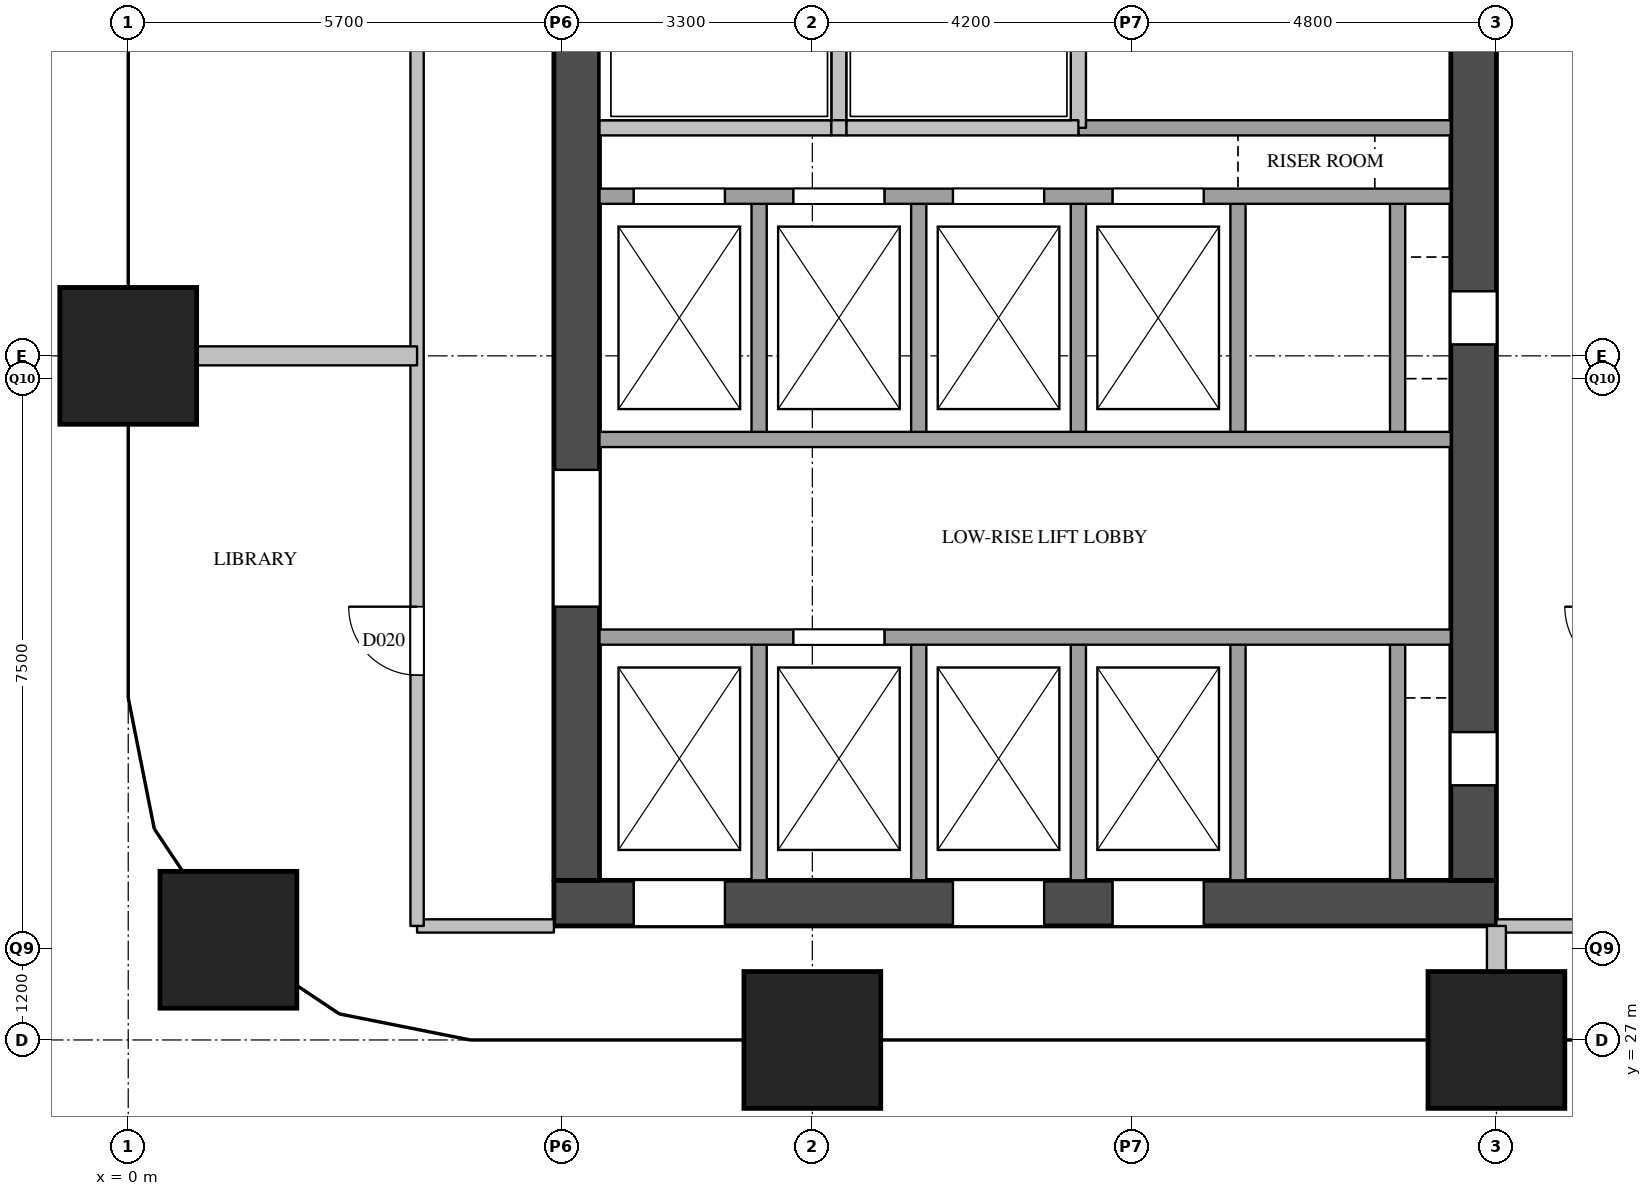
"""IFC4 building model, lengths in metres.
Left out: names, types, materials, properties, quantities, classifications, styles, units other than length and angle.
Written with IfcOpenShell. Run it as: python <this file> out.ifc"""

import sys

from ifc_helpers import new_model, si_unit, direction, frame, frame_2d, origin, origin_2d, place, context, subcontext, project, spatial, rectangle, extrude, element, fill, save


model = new_model("IFC4")
c1 = context("Model", 3, precision=1e-05, world=origin(), true_north=direction((0.0, 1.0)))
c2 = subcontext(c1, "Body", "Model", "MODEL_VIEW")
j1 = project(units=[si_unit("LENGTHUNIT", "METRE"), si_unit("PLANEANGLEUNIT", "RADIAN")], contexts=[c1])
p1 = place(None, origin())
s1 = spatial("IfcSite", under=j1, at=p1, CompositionType="ELEMENT")
p2 = place(p1, origin())
s2 = spatial("IfcBuilding", under=s1, at=p2, CompositionType="ELEMENT")
p3 = place(p2, frame((0.0, 0.0, 100.6)))
s3 = spatial("IfcBuildingStorey", under=s2, at=p3, CompositionType="ELEMENT", Elevation=100.6)
for number, where, z_axis, x_axis in (
    (1, (1.318, 28.318, 0.0), (0.0, 0.0, 1.0), (1.0, 0.0, 0.0)),
    (2, (0.0, 36.0, 0.0), (0.0, 0.0, 1.0), (1.0, 0.0, 0.0)),
    (3, (9.0, 27.0, 0.0), (0.0, 0.0, 1.0), (1.0, 0.0, 0.0)),
    (4, (18.0, 27.0, 0.0), (0.0, 0.0, 1.0), (1.0, 0.0, 0.0)),
):
    element("IfcColumn", number, at=place(p3, frame(where, z_axis=z_axis, x_axis=x_axis)), inside=s3, PredefinedType="COLUMN", context=c2, shape_type="SweptSolid", body=[
        extrude(rectangle(XDim=1.8, YDim=1.8, at=origin_2d()), origin(), (0.0, 0.0, 1.0), 3.8),
    ])
p4 = place(p3, frame((5.6, 28.8, 0.0), z_axis=(0.0, 0.0, 1.0), x_axis=(1.0, 0.0, 0.0)))
e5 = element("IfcWall", 5, at=p4, inside=s3, PredefinedType="SHEAR", context=c2, shape_type="SweptSolid", body=[
    extrude(rectangle(XDim=12.4, YDim=0.6, at=frame_2d((6.2, 0.0))), origin(), (0.0, 0.0, 1.0), 3.5),
])
p5 = place(p4, frame((1.05, 0.0, 0.0)))
e6 = element("IfcOpeningElement", 6, at=p5, cuts=e5, PredefinedType="OPENING", context=c2, shape_type="SweptSolid", body=[
    extrude(rectangle(XDim=1.2, YDim=2.1, at=frame_2d((0.6, 1.05))), frame((0.0, 0.31, 0.0), z_axis=(0.0, -1.0, 0.0), x_axis=(1.0, 0.0, 0.0)), (0.0, 0.0, 1.0), 0.62),
])
p6 = place(p4, frame((5.25, 0.0, 0.0)))
e7 = element("IfcOpeningElement", 7, at=p6, cuts=e5, PredefinedType="OPENING", context=c2, shape_type="SweptSolid", body=[
    extrude(rectangle(XDim=1.2, YDim=2.1, at=frame_2d((0.6, 1.05))), frame((0.0, 0.31, 0.0), z_axis=(0.0, -1.0, 0.0), x_axis=(1.0, 0.0, 0.0)), (0.0, 0.0, 1.0), 0.62),
])
p7 = place(p4, frame((7.35, 0.0, 0.0)))
e8 = element("IfcOpeningElement", 8, at=p7, cuts=e5, PredefinedType="OPENING", context=c2, shape_type="SweptSolid", body=[
    extrude(rectangle(XDim=1.2, YDim=2.1, at=frame_2d((0.6, 1.05))), frame((0.0, 0.31, 0.0), z_axis=(0.0, -1.0, 0.0), x_axis=(1.0, 0.0, 0.0)), (0.0, 0.0, 1.0), 0.62),
])
p8 = place(p3, frame((5.9, 29.1, 0.0), z_axis=(0.0, 0.0, 1.0), x_axis=(0.0, 1.0, 0.0)))
e9 = element("IfcWall", 9, at=p8, inside=s3, PredefinedType="SHEAR", context=c2, shape_type="SweptSolid", body=[
    extrude(rectangle(XDim=20.3, YDim=0.6, at=frame_2d((10.15, 0.0))), origin(), (0.0, 0.0, 1.0), 3.5),
])
p9 = place(p8, frame((3.6, 0.0, 0.0)))
e10 = element("IfcOpeningElement", 10, at=p9, cuts=e9, PredefinedType="OPENING", context=c2, shape_type="SweptSolid", body=[
    extrude(rectangle(XDim=1.8, YDim=2.1, at=frame_2d((0.9, 1.05))), frame((0.0, 0.31, 0.0), z_axis=(0.0, -1.0, 0.0), x_axis=(1.0, 0.0, 0.0)), (0.0, 0.0, 1.0), 0.62),
])
p10 = place(p8, frame((16.4, 0.0, 0.0)))
e11 = element("IfcOpeningElement", 11, at=p10, cuts=e9, PredefinedType="OPENING", context=c2, shape_type="SweptSolid", body=[
    extrude(rectangle(XDim=1.0, YDim=2.1, at=frame_2d((0.5, 1.05))), frame((0.0, 0.31, 0.0), z_axis=(0.0, -1.0, 0.0), x_axis=(1.0, 0.0, 0.0)), (0.0, 0.0, 1.0), 0.62),
])
p11 = place(p3, frame((17.7, 29.1, 0.0), z_axis=(0.0, 0.0, 1.0), x_axis=(0.0, 1.0, 0.0)))
e12 = element("IfcWall", 12, at=p11, inside=s3, PredefinedType="SHEAR", context=c2, shape_type="SweptSolid", body=[
    extrude(rectangle(XDim=20.3, YDim=0.6, at=frame_2d((10.15, 0.0))), origin(), (0.0, 0.0, 1.0), 3.5),
])
p12 = place(p11, frame((1.25, 0.0, 0.0)))
e13 = element("IfcOpeningElement", 13, at=p12, cuts=e12, PredefinedType="OPENING", context=c2, shape_type="SweptSolid", body=[
    extrude(rectangle(XDim=0.7, YDim=2.1, at=frame_2d((0.35, 1.05))), frame((0.0, 0.31, 0.0), z_axis=(0.0, -1.0, 0.0), x_axis=(1.0, 0.0, 0.0)), (0.0, 0.0, 1.0), 0.62),
])
p13 = place(p11, frame((7.05, 0.0, 0.0)))
e14 = element("IfcOpeningElement", 14, at=p13, cuts=e12, PredefinedType="OPENING", context=c2, shape_type="SweptSolid", body=[
    extrude(rectangle(XDim=0.7, YDim=2.1, at=frame_2d((0.35, 1.05))), frame((0.0, 0.31, 0.0), z_axis=(0.0, -1.0, 0.0), x_axis=(1.0, 0.0, 0.0)), (0.0, 0.0, 1.0), 0.62),
])
p14 = place(p3, frame((8.3, 29.1, 0.0), z_axis=(0.0, 0.0, 1.0), x_axis=(0.0, 1.0, 0.0)))
e15 = element("IfcWall", 15, at=p14, inside=s3, PredefinedType="SOLIDWALL", context=c2, shape_type="SweptSolid", body=[
    extrude(rectangle(XDim=3.2, YDim=0.2, at=frame_2d((1.6, 0.0))), origin(), (0.0, 0.0, 1.0), 3.5),
])
p15 = place(p3, frame((8.3, 34.9, 0.0), z_axis=(0.0, 0.0, 1.0), x_axis=(0.0, 1.0, 0.0)))
e16 = element("IfcWall", 16, at=p15, inside=s3, PredefinedType="SOLIDWALL", context=c2, shape_type="SweptSolid", body=[
    extrude(rectangle(XDim=3.2, YDim=0.2, at=frame_2d((1.6, 0.0))), origin(), (0.0, 0.0, 1.0), 3.5),
])
p16 = place(p3, frame((9.35, 39.0, 0.0), z_axis=(0.0, 0.0, 1.0), x_axis=(0.0, 1.0, 0.0)))
e17 = element("IfcWall", 17, at=p16, inside=s3, PredefinedType="SOLIDWALL", context=c2, shape_type="SweptSolid", body=[
    extrude(rectangle(XDim=1.9, YDim=0.2, at=frame_2d((0.95, 0.0))), origin(), (0.0, 0.0, 1.0), 3.5),
])
p17 = place(p3, frame((10.4, 29.1, 0.0), z_axis=(0.0, 0.0, 1.0), x_axis=(0.0, 1.0, 0.0)))
e18 = element("IfcWall", 18, at=p17, inside=s3, PredefinedType="SOLIDWALL", context=c2, shape_type="SweptSolid", body=[
    extrude(rectangle(XDim=3.2, YDim=0.2, at=frame_2d((1.6, 0.0))), origin(), (0.0, 0.0, 1.0), 3.5),
])
p18 = place(p3, frame((10.4, 34.9, 0.0), z_axis=(0.0, 0.0, 1.0), x_axis=(0.0, 1.0, 0.0)))
e19 = element("IfcWall", 19, at=p18, inside=s3, PredefinedType="SOLIDWALL", context=c2, shape_type="SweptSolid", body=[
    extrude(rectangle(XDim=3.2, YDim=0.2, at=frame_2d((1.6, 0.0))), origin(), (0.0, 0.0, 1.0), 3.5),
])
p19 = place(p3, frame((12.5, 29.1, 0.0), z_axis=(0.0, 0.0, 1.0), x_axis=(0.0, 1.0, 0.0)))
e20 = element("IfcWall", 20, at=p19, inside=s3, PredefinedType="SOLIDWALL", context=c2, shape_type="SweptSolid", body=[
    extrude(rectangle(XDim=3.2, YDim=0.2, at=frame_2d((1.6, 0.0))), origin(), (0.0, 0.0, 1.0), 3.5),
])
p20 = place(p3, frame((12.5, 34.9, 0.0), z_axis=(0.0, 0.0, 1.0), x_axis=(0.0, 1.0, 0.0)))
e21 = element("IfcWall", 21, at=p20, inside=s3, PredefinedType="SOLIDWALL", context=c2, shape_type="SweptSolid", body=[
    extrude(rectangle(XDim=3.2, YDim=0.2, at=frame_2d((1.6, 0.0))), origin(), (0.0, 0.0, 1.0), 3.5),
])
p21 = place(p3, frame((12.5, 39.0, 0.0), z_axis=(0.0, 0.0, 1.0), x_axis=(0.0, 1.0, 0.0)))
e22 = element("IfcWall", 22, at=p21, inside=s3, PredefinedType="SOLIDWALL", context=c2, shape_type="SweptSolid", body=[
    extrude(rectangle(XDim=1.9, YDim=0.2, at=frame_2d((0.95, 0.0))), origin(), (0.0, 0.0, 1.0), 3.5),
])
p22 = place(p3, frame((14.6, 29.1, 0.0), z_axis=(0.0, 0.0, 1.0), x_axis=(0.0, 1.0, 0.0)))
e23 = element("IfcWall", 23, at=p22, inside=s3, PredefinedType="SOLIDWALL", context=c2, shape_type="SweptSolid", body=[
    extrude(rectangle(XDim=3.2, YDim=0.2, at=frame_2d((1.6, 0.0))), origin(), (0.0, 0.0, 1.0), 3.5),
])
p23 = place(p3, frame((14.6, 34.9, 0.0), z_axis=(0.0, 0.0, 1.0), x_axis=(0.0, 1.0, 0.0)))
e24 = element("IfcWall", 24, at=p23, inside=s3, PredefinedType="SOLIDWALL", context=c2, shape_type="SweptSolid", body=[
    extrude(rectangle(XDim=3.2, YDim=0.2, at=frame_2d((1.6, 0.0))), origin(), (0.0, 0.0, 1.0), 3.5),
])
p24 = place(p3, frame((16.7, 29.1, 0.0), z_axis=(0.0, 0.0, 1.0), x_axis=(0.0, 1.0, 0.0)))
e25 = element("IfcWall", 25, at=p24, inside=s3, PredefinedType="SOLIDWALL", context=c2, shape_type="SweptSolid", body=[
    extrude(rectangle(XDim=3.2, YDim=0.2, at=frame_2d((1.6, 0.0))), origin(), (0.0, 0.0, 1.0), 3.5),
])
p25 = place(p3, frame((16.7, 34.9, 0.0), z_axis=(0.0, 0.0, 1.0), x_axis=(0.0, 1.0, 0.0)))
e26 = element("IfcWall", 26, at=p25, inside=s3, PredefinedType="SOLIDWALL", context=c2, shape_type="SweptSolid", body=[
    extrude(rectangle(XDim=3.2, YDim=0.2, at=frame_2d((1.6, 0.0))), origin(), (0.0, 0.0, 1.0), 3.5),
])
p26 = place(p3, frame((6.2, 32.3, 0.0), z_axis=(0.0, 0.0, 1.0), x_axis=(1.0, 0.0, 0.0)))
e27 = element("IfcWall", 27, at=p26, inside=s3, PredefinedType="SOLIDWALL", context=c2, shape_type="SweptSolid", body=[
    extrude(rectangle(XDim=11.2, YDim=0.2, at=frame_2d((5.6, 0.0))), origin(), (0.0, 0.0, 1.0), 3.5),
])
p27 = place(p26, frame((2.55, 0.0, 0.0)))
e28 = element("IfcOpeningElement", 28, at=p27, cuts=e27, PredefinedType="OPENING", context=c2, shape_type="SweptSolid", body=[
    extrude(rectangle(XDim=1.2, YDim=2.1, at=frame_2d((0.6, 1.05))), frame((0.0, 0.11, 0.0), z_axis=(0.0, -1.0, 0.0), x_axis=(1.0, 0.0, 0.0)), (0.0, 0.0, 1.0), 0.22),
])
p28 = place(p3, frame((6.2, 34.9, 0.0), z_axis=(0.0, 0.0, 1.0), x_axis=(1.0, 0.0, 0.0)))
e29 = element("IfcWall", 29, at=p28, inside=s3, PredefinedType="SOLIDWALL", context=c2, shape_type="SweptSolid", body=[
    extrude(rectangle(XDim=11.2, YDim=0.2, at=frame_2d((5.6, 0.0))), origin(), (0.0, 0.0, 1.0), 3.5),
])
p29 = place(p3, frame((6.2, 38.1, 0.0), z_axis=(0.0, 0.0, 1.0), x_axis=(1.0, 0.0, 0.0)))
e30 = element("IfcWall", 30, at=p29, inside=s3, PredefinedType="SOLIDWALL", context=c2, shape_type="SweptSolid", body=[
    extrude(rectangle(XDim=11.2, YDim=0.2, at=frame_2d((5.6, 0.0))), origin(), (0.0, 0.0, 1.0), 3.5),
])
p30 = place(p29, frame((0.45, 0.0, 0.0)))
e31 = element("IfcOpeningElement", 31, at=p30, cuts=e30, PredefinedType="OPENING", context=c2, shape_type="SweptSolid", body=[
    extrude(rectangle(XDim=1.2, YDim=2.1, at=frame_2d((0.6, 1.05))), frame((0.0, 0.11, 0.0), z_axis=(0.0, -1.0, 0.0), x_axis=(1.0, 0.0, 0.0)), (0.0, 0.0, 1.0), 0.22),
])
p31 = place(p29, frame((2.55, 0.0, 0.0)))
e32 = element("IfcOpeningElement", 32, at=p31, cuts=e30, PredefinedType="OPENING", context=c2, shape_type="SweptSolid", body=[
    extrude(rectangle(XDim=1.2, YDim=2.1, at=frame_2d((0.6, 1.05))), frame((0.0, 0.11, 0.0), z_axis=(0.0, -1.0, 0.0), x_axis=(1.0, 0.0, 0.0)), (0.0, 0.0, 1.0), 0.22),
])
p32 = place(p29, frame((4.65, 0.0, 0.0)))
e33 = element("IfcOpeningElement", 33, at=p32, cuts=e30, PredefinedType="OPENING", context=c2, shape_type="SweptSolid", body=[
    extrude(rectangle(XDim=1.2, YDim=2.1, at=frame_2d((0.6, 1.05))), frame((0.0, 0.11, 0.0), z_axis=(0.0, -1.0, 0.0), x_axis=(1.0, 0.0, 0.0)), (0.0, 0.0, 1.0), 0.22),
])
p33 = place(p29, frame((6.75, 0.0, 0.0)))
e34 = element("IfcOpeningElement", 34, at=p33, cuts=e30, PredefinedType="OPENING", context=c2, shape_type="SweptSolid", body=[
    extrude(rectangle(XDim=1.2, YDim=2.1, at=frame_2d((0.6, 1.05))), frame((0.0, 0.11, 0.0), z_axis=(0.0, -1.0, 0.0), x_axis=(1.0, 0.0, 0.0)), (0.0, 0.0, 1.0), 0.22),
])
p34 = place(p3, frame((12.5, 39.0, 0.0), z_axis=(0.0, 0.0, 1.0), x_axis=(1.0, 0.0, 0.0)))
e35 = element("IfcWall", 35, at=p34, inside=s3, PredefinedType="SOLIDWALL", context=c2, shape_type="SweptSolid", body=[
    extrude(rectangle(XDim=4.9, YDim=0.2, at=frame_2d((2.45, 0.0))), origin(), (0.0, 0.0, 1.0), 3.5),
])
p35 = place(p3, frame((6.2, 39.0, 0.0), z_axis=(0.0, 0.0, 1.0), x_axis=(1.0, 0.0, 0.0)))
e36 = element("IfcWall", 36, at=p35, inside=s3, PredefinedType="SOLIDWALL", context=c2, shape_type="SweptSolid", body=[
    extrude(rectangle(XDim=3.05, YDim=0.2, at=frame_2d((1.525, 0.0))), origin(), (0.0, 0.0, 1.0), 3.5),
])
p36 = place(p3, frame((9.25, 39.0, 0.0), z_axis=(0.0, 0.0, 1.0), x_axis=(1.0, 0.0, 0.0)))
e37 = element("IfcWall", 37, at=p36, inside=s3, PredefinedType="SOLIDWALL", context=c2, shape_type="SweptSolid", body=[
    extrude(rectangle(XDim=0.2, YDim=0.2, at=frame_2d((0.1, 0.0))), origin(), (0.0, 0.0, 1.0), 3.5),
])
p37 = place(p3, frame((9.45, 39.0, 0.0), z_axis=(0.0, 0.0, 1.0), x_axis=(1.0, 0.0, 0.0)))
e38 = element("IfcWall", 38, at=p37, inside=s3, PredefinedType="SOLIDWALL", context=c2, shape_type="SweptSolid", body=[
    extrude(rectangle(XDim=3.05, YDim=0.2, at=frame_2d((1.525, 0.0))), origin(), (0.0, 0.0, 1.0), 3.5),
])
for number, where, z_axis, x_axis in (
    (39, (3.8, 28.5, 0.0), (0.0, 0.0, 1.0), (1.0, 0.0, 0.0)),
    (40, (18.0, 28.5, 0.0), (0.0, 0.0, 1.0), (1.0, 0.0, 0.0)),
):
    element("IfcWall", number, at=place(p3, frame(where, z_axis=z_axis, x_axis=x_axis)), inside=s3, PredefinedType="PARTITIONING", context=c2, shape_type="SweptSolid", body=[
        extrude(rectangle(XDim=1.8, YDim=0.175, at=frame_2d((0.9, 0.0))), origin(), (0.0, 0.0, 1.0), 3.5),
    ])
p38 = place(p3, frame((3.8, 28.5, 0.0), z_axis=(0.0, 0.0, 1.0), x_axis=(0.0, 1.0, 0.0)))
e41 = element("IfcWall", 41, at=p38, inside=s3, PredefinedType="PARTITIONING", context=c2, shape_type="SweptSolid", body=[
    extrude(rectangle(XDim=23.3, YDim=0.175, at=frame_2d((11.65, 0.0))), origin(), (0.0, 0.0, 1.0), 3.5),
])
p39 = place(p38, frame((3.3, 0.0, 0.0)))
e42 = element("IfcOpeningElement", 42, at=p39, cuts=e41, PredefinedType="OPENING", context=c2, shape_type="SweptSolid", body=[
    extrude(rectangle(XDim=0.9, YDim=2.1, at=frame_2d((0.45, 1.05))), frame((0.0, 0.097, 0.0), z_axis=(0.0, -1.0, 0.0), x_axis=(1.0, 0.0, 0.0)), (0.0, 0.0, 1.0), 0.195),
])
p40 = place(p38, frame((11.55, 0.0, 0.0)))
e43 = element("IfcOpeningElement", 43, at=p40, cuts=e41, PredefinedType="OPENING", context=c2, shape_type="SweptSolid", body=[
    extrude(rectangle(XDim=0.9, YDim=2.1, at=frame_2d((0.45, 1.05))), frame((0.0, 0.097, 0.0), z_axis=(0.0, -1.0, 0.0), x_axis=(1.0, 0.0, 0.0)), (0.0, 0.0, 1.0), 0.195),
])
p41 = place(p38, frame((19.45, 0.0, 0.0)))
e44 = element("IfcOpeningElement", 44, at=p41, cuts=e41, PredefinedType="OPENING", context=c2, shape_type="SweptSolid", body=[
    extrude(rectangle(XDim=0.9, YDim=2.1, at=frame_2d((0.45, 1.05))), frame((0.0, 0.097, 0.0), z_axis=(0.0, -1.0, 0.0), x_axis=(1.0, 0.0, 0.0)), (0.0, 0.0, 1.0), 0.195),
])
p42 = place(p3, frame((0.0, 36.0, 0.0), z_axis=(0.0, 0.0, 1.0), x_axis=(1.0, 0.0, 0.0)))
e45 = element("IfcWall", 45, at=p42, inside=s3, PredefinedType="PARTITIONING", context=c2, shape_type="SweptSolid", body=[
    extrude(rectangle(XDim=3.8, YDim=0.25, at=frame_2d((1.9, 0.0))), origin(), (0.0, 0.0, 1.0), 3.5),
])
p43 = place(p3, frame((18.0, 27.0, 0.0), z_axis=(0.0, 0.0, 1.0), x_axis=(0.0, 1.0, 0.0)))
e46 = element("IfcWall", 46, at=p43, inside=s3, PredefinedType="PARTITIONING", context=c2, shape_type="SweptSolid", body=[
    extrude(rectangle(XDim=1.5, YDim=0.25, at=frame_2d((0.75, 0.0))), origin(), (0.0, 0.0, 1.0), 3.5),
])
p44 = place(p5, origin())
e47 = element("IfcDoor", 47, at=p44, inside=s3, OperationType="SLIDING_TO_LEFT", PredefinedType="DOOR", context=c2, shape_type="SweptSolid", body=[
    extrude(rectangle(XDim=1.2, YDim=2.1, at=frame_2d((0.6, 1.05))), frame((0.0, 0.025, 0.0), z_axis=(0.0, -1.0, 0.0), x_axis=(1.0, 0.0, 0.0)), (0.0, 0.0, 1.0), 0.05),
])
fill(e6, e47)
p45 = place(p27, origin())
e48 = element("IfcDoor", 48, at=p45, inside=s3, OperationType="SLIDING_TO_LEFT", PredefinedType="DOOR", context=c2, shape_type="SweptSolid", body=[
    extrude(rectangle(XDim=1.2, YDim=2.1, at=frame_2d((0.6, 1.05))), frame((0.0, 0.025, 0.0), z_axis=(0.0, -1.0, 0.0), x_axis=(1.0, 0.0, 0.0)), (0.0, 0.0, 1.0), 0.05),
])
fill(e28, e48)
p46 = place(p6, origin())
e49 = element("IfcDoor", 49, at=p46, inside=s3, OperationType="SLIDING_TO_LEFT", PredefinedType="DOOR", context=c2, shape_type="SweptSolid", body=[
    extrude(rectangle(XDim=1.2, YDim=2.1, at=frame_2d((0.6, 1.05))), frame((0.0, 0.025, 0.0), z_axis=(0.0, -1.0, 0.0), x_axis=(1.0, 0.0, 0.0)), (0.0, 0.0, 1.0), 0.05),
])
fill(e7, e49)
p47 = place(p7, origin())
e50 = element("IfcDoor", 50, at=p47, inside=s3, OperationType="SLIDING_TO_LEFT", PredefinedType="DOOR", context=c2, shape_type="SweptSolid", body=[
    extrude(rectangle(XDim=1.2, YDim=2.1, at=frame_2d((0.6, 1.05))), frame((0.0, 0.025, 0.0), z_axis=(0.0, -1.0, 0.0), x_axis=(1.0, 0.0, 0.0)), (0.0, 0.0, 1.0), 0.05),
])
fill(e8, e50)
p48 = place(p30, origin())
e51 = element("IfcDoor", 51, at=p48, inside=s3, OperationType="SLIDING_TO_LEFT", PredefinedType="DOOR", context=c2, shape_type="SweptSolid", body=[
    extrude(rectangle(XDim=1.2, YDim=2.1, at=frame_2d((0.6, 1.05))), frame((0.0, 0.025, 0.0), z_axis=(0.0, -1.0, 0.0), x_axis=(1.0, 0.0, 0.0)), (0.0, 0.0, 1.0), 0.05),
])
fill(e31, e51)
p49 = place(p31, origin())
e52 = element("IfcDoor", 52, at=p49, inside=s3, OperationType="SLIDING_TO_LEFT", PredefinedType="DOOR", context=c2, shape_type="SweptSolid", body=[
    extrude(rectangle(XDim=1.2, YDim=2.1, at=frame_2d((0.6, 1.05))), frame((0.0, 0.025, 0.0), z_axis=(0.0, -1.0, 0.0), x_axis=(1.0, 0.0, 0.0)), (0.0, 0.0, 1.0), 0.05),
])
fill(e32, e52)
p50 = place(p32, origin())
e53 = element("IfcDoor", 53, at=p50, inside=s3, OperationType="SLIDING_TO_LEFT", PredefinedType="DOOR", context=c2, shape_type="SweptSolid", body=[
    extrude(rectangle(XDim=1.2, YDim=2.1, at=frame_2d((0.6, 1.05))), frame((0.0, 0.025, 0.0), z_axis=(0.0, -1.0, 0.0), x_axis=(1.0, 0.0, 0.0)), (0.0, 0.0, 1.0), 0.05),
])
fill(e33, e53)
p51 = place(p33, origin())
e54 = element("IfcDoor", 54, at=p51, inside=s3, OperationType="SLIDING_TO_LEFT", PredefinedType="DOOR", context=c2, shape_type="SweptSolid", body=[
    extrude(rectangle(XDim=1.2, YDim=2.1, at=frame_2d((0.6, 1.05))), frame((0.0, 0.025, 0.0), z_axis=(0.0, -1.0, 0.0), x_axis=(1.0, 0.0, 0.0)), (0.0, 0.0, 1.0), 0.05),
])
fill(e34, e54)
p52 = place(p12, origin())
e55 = element("IfcDoor", 55, at=p52, inside=s3, OperationType="SINGLE_SWING_LEFT", PredefinedType="DOOR", context=c2, shape_type="SweptSolid", body=[
    extrude(rectangle(XDim=0.7, YDim=2.1, at=frame_2d((0.35, 1.05))), frame((0.0, 0.025, 0.0), z_axis=(0.0, -1.0, 0.0), x_axis=(1.0, 0.0, 0.0)), (0.0, 0.0, 1.0), 0.05),
])
fill(e13, e55)
p53 = place(p13, origin())
e56 = element("IfcDoor", 56, at=p53, inside=s3, OperationType="SINGLE_SWING_LEFT", PredefinedType="DOOR", context=c2, shape_type="SweptSolid", body=[
    extrude(rectangle(XDim=0.7, YDim=2.1, at=frame_2d((0.35, 1.05))), frame((0.0, 0.025, 0.0), z_axis=(0.0, -1.0, 0.0), x_axis=(1.0, 0.0, 0.0)), (0.0, 0.0, 1.0), 0.05),
])
fill(e14, e56)
p54 = place(p9, origin())
e57 = element("IfcDoor", 57, at=p54, inside=s3, OperationType="DOUBLE_DOOR_SINGLE_SWING", PredefinedType="DOOR", context=c2, shape_type="SweptSolid", body=[
    extrude(rectangle(XDim=1.8, YDim=2.1, at=frame_2d((0.9, 1.05))), frame((0.0, 0.025, 0.0), z_axis=(0.0, -1.0, 0.0), x_axis=(1.0, 0.0, 0.0)), (0.0, 0.0, 1.0), 0.05),
])
fill(e10, e57)
p55 = place(p39, origin())
e58 = element("IfcDoor", 58, at=p55, inside=s3, OperationType="SINGLE_SWING_RIGHT", PredefinedType="DOOR", context=c2, shape_type="SweptSolid", body=[
    extrude(rectangle(XDim=0.9, YDim=2.1, at=frame_2d((0.45, 1.05))), frame((0.0, 0.025, 0.0), z_axis=(0.0, -1.0, 0.0), x_axis=(1.0, 0.0, 0.0)), (0.0, 0.0, 1.0), 0.05),
])
fill(e42, e58)
save(model, sys.argv[1])
